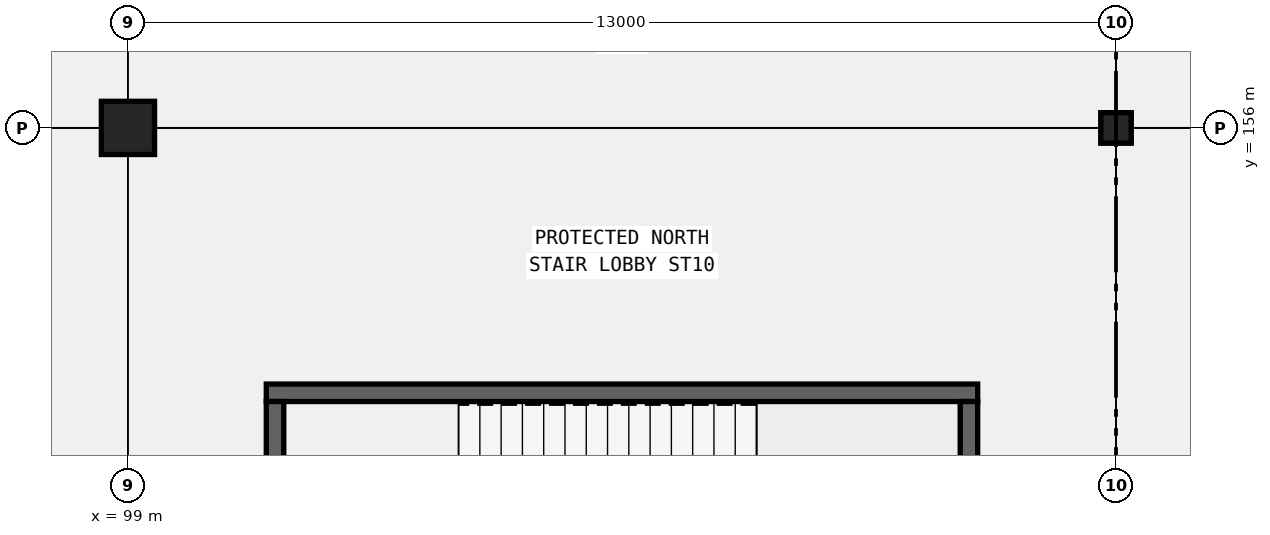
"""IFC4 building model, lengths in metres.
Left out: names, types, materials, properties, quantities, classifications, styles, units other than length and angle.
Written with IfcOpenShell. Run it as: python <this file> out.ifc"""

import sys

from ifc_helpers import new_model, si_unit, direction, frame, frame_2d, origin, origin_2d, place, context, subcontext, project, spatial, rectangle, hollow_rectangle, extrude, element, save


model = new_model("IFC4")
c1 = context("Model", 3, precision=1e-05, world=origin(), true_north=direction((0.0, 1.0)))
c2 = subcontext(c1, "Body", "Model", "MODEL_VIEW")
j1 = project(units=[si_unit("LENGTHUNIT", "METRE"), si_unit("PLANEANGLEUNIT", "RADIAN")], contexts=[c1])
p1 = place(None, origin())
s1 = spatial("IfcSite", under=j1, at=p1, CompositionType="ELEMENT")
p2 = place(p1, origin())
s2 = spatial("IfcBuilding", under=s1, at=p2, CompositionType="ELEMENT")
p3 = place(p2, frame((0.0, 0.0, 15.3)))
s3 = spatial("IfcBuildingStorey", under=s2, at=p3, CompositionType="ELEMENT", Elevation=15.3)
p4 = place(p3, frame((99.0, 156.0, 0.0), z_axis=(0.0, 0.0, 1.0), x_axis=(1.0, 0.0, 0.0)))
e1 = element("IfcColumn", 1, at=p4, inside=s3, PredefinedType="COLUMN", context=c2, shape_type="SweptSolid", body=[
    extrude(rectangle(XDim=0.7, YDim=0.7, at=origin_2d()), origin(), (0.0, 0.0, 1.0), 5.1),
])
p5 = place(p3, frame((112.0, 156.0, 0.0), z_axis=(0.0, 0.0, 1.0), x_axis=(1.0, 0.0, 0.0)))
e2 = element("IfcColumn", 2, at=p5, inside=s3, PredefinedType="COLUMN", context=c2, shape_type="SweptSolid", body=[
    extrude(hollow_rectangle(XDim=0.4, YDim=0.4, WallThickness=0.016, InnerFilletRadius=0.016, OuterFilletRadius=0.032, at=origin_2d()), origin(), (0.0, 0.0, 1.0), 5.1),
])
p6 = place(p3, frame((100.82, 152.515, 0.0), z_axis=(0.0, 0.0, 1.0), x_axis=(1.0, 0.0, 0.0)))
e3 = element("IfcWall", 3, at=p6, inside=s3, PredefinedType="SHEAR", context=c2, shape_type="SweptSolid", body=[
    extrude(rectangle(XDim=9.36, YDim=0.23, at=frame_2d((4.68, 0.0))), origin(), (0.0, 0.0, 1.0), 4.86),
])
for number, where, z_axis, x_axis in (
    (4, (100.935, 147.6, 0.0), (0.0, 0.0, 1.0), (0.0, 1.0, 0.0)),
    (5, (110.065, 147.6, 0.0), (0.0, 0.0, 1.0), (0.0, 1.0, 0.0)),
):
    element("IfcWall", number, at=place(p3, frame(where, z_axis=z_axis, x_axis=x_axis)), inside=s3, PredefinedType="SHEAR", context=c2, shape_type="SweptSolid", body=[
        extrude(rectangle(XDim=4.8, YDim=0.23, at=frame_2d((2.4, 0.0))), origin(), (0.0, 0.0, 1.0), 4.86),
    ])
save(model, sys.argv[1])
